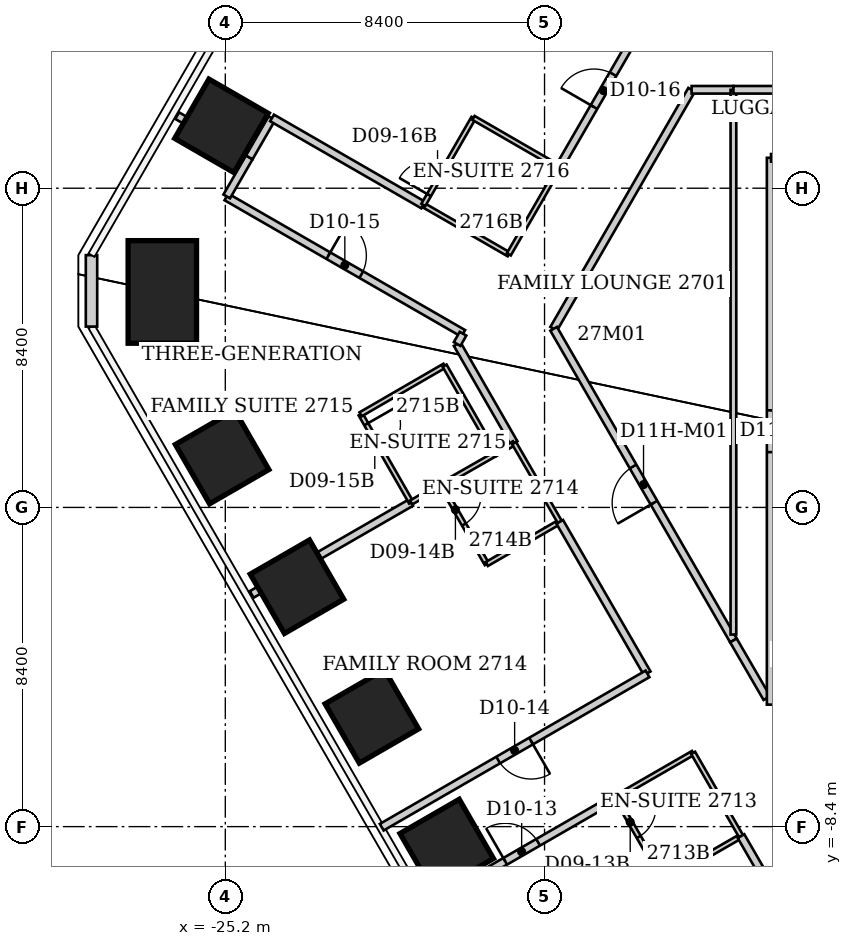
"""IFC4 building model, lengths in metres.
Left out: names, types, materials, properties, quantities, classifications, styles, units other than length and angle.
Written with IfcOpenShell. Run it as: python <this file> out.ifc"""

import sys

from ifc_helpers import new_model, si_unit, direction, frame, frame_2d, origin, origin_2d, place, context, subcontext, project, spatial, rectangle, extrude, element, fill, save


model = new_model("IFC4")
c1 = context("Model", 3, precision=1e-05, world=origin(), true_north=direction((0.0, 1.0)))
c2 = subcontext(c1, "Body", "Model", "MODEL_VIEW")
j1 = project(units=[si_unit("LENGTHUNIT", "METRE"), si_unit("PLANEANGLEUNIT", "RADIAN")], contexts=[c1])
p1 = place(None, origin())
s1 = spatial("IfcSite", under=j1, at=p1, CompositionType="ELEMENT")
p2 = place(p1, origin())
s2 = spatial("IfcBuilding", under=s1, at=p2, CompositionType="ELEMENT")
p3 = place(p2, frame((0.0, 0.0, 112.0)))
s3 = spatial("IfcBuildingStorey", under=s2, at=p3, CompositionType="ELEMENT", Elevation=112.0)
for number, where, z_axis, x_axis in (
    (1, (-19.374, -8.911, 0.0), (0.0, 0.0, 1.0), (-0.866, -0.5, 0.0)),
    (2, (-21.344, -5.499, 0.0), (0.0, 0.0, 1.0), (-0.866, -0.5, 0.0)),
    (3, (-23.314, -2.087, 0.0), (0.0, 0.0, 1.0), (-0.866, -0.5, 0.0)),
    (4, (-25.284, 1.325, 0.0), (0.0, 0.0, 1.0), (-0.866, -0.5, 0.0)),
):
    element("IfcColumn", number, at=place(p3, frame(where, z_axis=z_axis, x_axis=x_axis)), inside=s3, PredefinedType="COLUMN", context=c2, shape_type="SweptSolid", body=[
        extrude(rectangle(XDim=1.8, YDim=1.8, at=origin_2d()), origin(), (0.0, 0.0, 1.0), 3.8),
    ])
p4 = place(p3, frame((-26.857, 5.67, 0.0), z_axis=(0.0, 0.0, 1.0), x_axis=(-1.0, 0.0, 0.0)))
e5 = element("IfcColumn", 5, at=p4, inside=s3, PredefinedType="COLUMN", context=c2, shape_type="SweptSolid", body=[
    extrude(rectangle(XDim=1.8, YDim=2.7, at=origin_2d()), origin(), (0.0, 0.0, 1.0), 3.8),
])
p5 = place(p3, frame((-25.302, 10.041, 0.0), z_axis=(0.0, 0.0, 1.0), x_axis=(-0.866025403784, 0.5, 0.0)))
e6 = element("IfcColumn", 6, at=p5, inside=s3, PredefinedType="COLUMN", context=c2, shape_type="SweptSolid", body=[
    extrude(rectangle(XDim=1.8, YDim=1.8, at=origin_2d()), origin(), (0.0, 0.0, 1.0), 3.8),
])
p6 = place(p3, frame((-28.721, 4.759, 0.0), z_axis=(0.0, 0.0, 1.0), x_axis=(0.0, 1.0, 0.0)))
e7 = element("IfcWall", 7, at=p6, inside=s3, PredefinedType="SOLIDWALL", context=c2, shape_type="SweptSolid", body=[
    extrude(rectangle(XDim=1.88, YDim=0.3, at=frame_2d((0.94, 0.0))), origin(), (0.0, 0.0, 1.0), 3.64),
])
p7 = place(p3, frame((-26.466, 10.31, 0.0), z_axis=(0.0, 0.0, 1.0), x_axis=(0.865037029405, -0.501708020425, 0.0)))
e8 = element("IfcWall", 8, at=p7, inside=s3, PredefinedType="PARTITIONING", context=c2, shape_type="SweptSolid", body=[
    extrude(rectangle(XDim=2.177, YDim=0.2, at=frame_2d((1.089, 0.0))), origin(), (0.0, 0.0, 1.0), 3.64),
])
p8 = place(p3, frame((-25.17, 8.17, 0.0), z_axis=(0.0, 0.0, 1.0), x_axis=(0.866448885678, -0.499265789443, 0.0)))
e9 = element("IfcWall", 9, at=p8, inside=s3, PredefinedType="PARTITIONING", context=c2, shape_type="SweptSolid", body=[
    extrude(rectangle(XDim=7.19, YDim=0.2, at=frame_2d((3.595, 0.0))), origin(), (0.0, 0.0, 1.0), 3.64),
])
p9 = place(p8, frame((3.095, 0.0, 0.0)))
e10 = element("IfcOpeningElement", 10, at=p9, cuts=e9, PredefinedType="OPENING", context=c2, shape_type="SweptSolid", body=[
    extrude(rectangle(XDim=1.0, YDim=2.13, at=frame_2d((0.5, 1.065))), frame((0.0, 0.1, 0.0), z_axis=(0.0, -1.0, 0.0), x_axis=(1.0, 0.0, 0.0)), (0.0, 0.0, 1.0), 0.2),
])
p10 = place(p3, frame((-25.163, 8.183, 0.0), z_axis=(0.0, 0.0, 1.0), x_axis=(0.499793761865, 0.866144442689, 0.0)))
e11 = element("IfcWall", 11, at=p10, inside=s3, PredefinedType="PARTITIONING", context=c2, shape_type="SweptSolid", body=[
    extrude(rectangle(XDim=1.186, YDim=0.2, at=frame_2d((0.593, 0.0))), origin(), (0.0, 0.0, 1.0), 3.64),
])
p11 = place(p3, frame((-24.57, 9.21, 0.0), z_axis=(0.0, 0.0, 1.0), x_axis=(0.499734288277, 0.866178758179, 0.0)))
e12 = element("IfcWall", 12, at=p11, inside=s3, PredefinedType="PARTITIONING", context=c2, shape_type="SweptSolid", body=[
    extrude(rectangle(XDim=1.191, YDim=0.2, at=frame_2d((0.595, 0.0))), origin(), (0.0, 0.0, 1.0), 3.64),
])
p12 = place(p3, frame((-24.506, -2.29, 0.0), z_axis=(0.0, 0.0, 1.0), x_axis=(0.86626361228, 0.499587183622, 0.0)))
e13 = element("IfcWall", 13, at=p12, inside=s3, PredefinedType="PARTITIONING", context=c2, shape_type="SweptSolid", body=[
    extrude(rectangle(XDim=4.844, YDim=0.2, at=frame_2d((2.422, 0.0))), origin(), (0.0, 0.0, 1.0), 3.64),
])
p13 = place(p3, frame((-23.97, 10.25, 0.0), z_axis=(0.0, 0.0, 1.0), x_axis=(0.86645101645, -0.499262091585, 0.0)))
e14 = element("IfcWall", 14, at=p13, inside=s3, PredefinedType="PARTITIONING", context=c2, shape_type="SweptSolid", body=[
    extrude(rectangle(XDim=4.592, YDim=0.2, at=frame_2d((2.296, 0.0))), origin(), (0.0, 0.0, 1.0), 3.64),
])
p14 = place(p3, frame((-21.64, 2.45, 0.0), z_axis=(0.0, 0.0, 1.0), x_axis=(0.497288831399, -0.867585049529, 0.0)))
e15 = element("IfcWall", 15, at=p14, inside=s3, PredefinedType="PARTITIONING", context=c2, shape_type="SweptSolid", body=[
    extrude(rectangle(XDim=2.674, YDim=0.12, at=frame_2d((1.337, 0.0))), origin(), (0.0, 0.0, 1.0), 3.64),
])
p15 = place(p14, frame((0.3, 0.0, 0.0)))
e16 = element("IfcOpeningElement", 16, at=p15, cuts=e15, PredefinedType="OPENING", context=c2, shape_type="SweptSolid", body=[
    extrude(rectangle(XDim=0.9, YDim=2.03, at=frame_2d((0.45, 1.015))), frame((0.0, 0.06, 0.0), z_axis=(0.0, -1.0, 0.0), x_axis=(1.0, 0.0, 0.0)), (0.0, 0.0, 1.0), 0.12),
])
p16 = place(p3, frame((-20.31, 0.13, 0.0), z_axis=(0.0, 0.0, 1.0), x_axis=(0.864088651014, 0.503339649926, 0.0)))
e17 = element("IfcWall", 17, at=p16, inside=s3, PredefinedType="PARTITIONING", context=c2, shape_type="SweptSolid", body=[
    extrude(rectangle(XDim=0.914, YDim=0.12, at=frame_2d((0.457, 0.0))), origin(), (0.0, 0.0, 1.0), 3.64),
])
p17 = place(p3, frame((-19.991, 7.958, 0.0), z_axis=(0.0, 0.0, 1.0), x_axis=(0.866404475641, -0.499342852747, 0.0)))
e18 = element("IfcWall", 18, at=p17, inside=s3, PredefinedType="PARTITIONING", context=c2, shape_type="SweptSolid", body=[
    extrude(rectangle(XDim=2.599, YDim=0.12, at=frame_2d((1.299, 0.0))), origin(), (0.0, 0.0, 1.0), 3.64),
])
p18 = place(p3, frame((-19.884, -10.495, 0.0), z_axis=(0.0, 0.0, 1.0), x_axis=(0.86608558139, 0.499895754841, 0.0)))
e19 = element("IfcWall", 19, at=p18, inside=s3, PredefinedType="PARTITIONING", context=c2, shape_type="SweptSolid", body=[
    extrude(rectangle(XDim=5.732, YDim=0.2, at=frame_2d((2.866, 0.0))), origin(), (0.0, 0.0, 1.0), 3.64),
])
p19 = place(p18, frame((2.366, 0.0, 0.0)))
e20 = element("IfcOpeningElement", 20, at=p19, cuts=e19, PredefinedType="OPENING", context=c2, shape_type="SweptSolid", body=[
    extrude(rectangle(XDim=1.0, YDim=2.13, at=frame_2d((0.5, 1.065))), frame((0.0, 0.1, 0.0), z_axis=(0.0, -1.0, 0.0), x_axis=(1.0, 0.0, 0.0)), (0.0, 0.0, 1.0), 0.2),
])
p20 = place(p3, frame((-19.52, 0.59, 0.0), z_axis=(0.0, 0.0, 1.0), x_axis=(0.499693115345, -0.866202511239, 0.0)))
e21 = element("IfcWall", 21, at=p20, inside=s3, PredefinedType="PARTITIONING", context=c2, shape_type="SweptSolid", body=[
    extrude(rectangle(XDim=2.401, YDim=0.12, at=frame_2d((1.201, 0.0))), origin(), (0.0, 0.0, 1.0), 3.64),
])
p21 = place(p20, frame((0.3, 0.0, 0.0)))
e22 = element("IfcOpeningElement", 22, at=p21, cuts=e21, PredefinedType="OPENING", context=c2, shape_type="SweptSolid", body=[
    extrude(rectangle(XDim=0.9, YDim=2.03, at=frame_2d((0.45, 1.015))), frame((0.0, 0.06, 0.0), z_axis=(0.0, -1.0, 0.0), x_axis=(1.0, 0.0, 0.0)), (0.0, 0.0, 1.0), 0.12),
])
p22 = place(p3, frame((-19.52, 0.59, 0.0), z_axis=(0.0, 0.0, 1.0), x_axis=(0.868013991935, 0.496539736381, 0.0)))
e23 = element("IfcWall", 23, at=p22, inside=s3, PredefinedType="PARTITIONING", context=c2, shape_type="SweptSolid", body=[
    extrude(rectangle(XDim=1.64, YDim=0.12, at=frame_2d((0.82, 0.0))), origin(), (0.0, 0.0, 1.0), 3.64),
])
p23 = place(p3, frame((-19.43, 3.73, 0.0), z_axis=(0.0, 0.0, 1.0), x_axis=(-0.865328095335, -0.50120583339, 0.0)))
e24 = element("IfcWall", 24, at=p23, inside=s3, PredefinedType="PARTITIONING", context=c2, shape_type="SweptSolid", body=[
    extrude(rectangle(XDim=2.554, YDim=0.12, at=frame_2d((1.277, 0.0))), origin(), (0.0, 0.0, 1.0), 3.64),
])
p24 = place(p3, frame((-19.1, 4.3, 0.0), z_axis=(0.0, 0.0, 1.0), x_axis=(0.498268459914, -0.867022803538, 0.0)))
e25 = element("IfcWall", 25, at=p24, inside=s3, PredefinedType="PARTITIONING", context=c2, shape_type="SweptSolid", body=[
    extrude(rectangle(XDim=3.01, YDim=0.2, at=frame_2d((1.505, 0.0))), origin(), (0.0, 0.0, 1.0), 3.64),
])
p25 = place(p3, frame((-18.945, 4.571, 0.0), z_axis=(0.0, 0.0, 1.0), x_axis=(-0.496223092577, -0.868195048588, 0.0)))
e26 = element("IfcWall", 26, at=p25, inside=s3, PredefinedType="PARTITIONING", context=c2, shape_type="SweptSolid", body=[
    extrude(rectangle(XDim=0.312, YDim=0.2, at=frame_2d((0.156, 0.0))), origin(), (0.0, 0.0, 1.0), 3.64),
])
p26 = place(p3, frame((-18.67, 10.25, 0.0), z_axis=(0.0, 0.0, 1.0), x_axis=(-0.499407914056, -0.866366975004, 0.0)))
e27 = element("IfcWall", 27, at=p26, inside=s3, PredefinedType="PARTITIONING", context=c2, shape_type="SweptSolid", body=[
    extrude(rectangle(XDim=2.643, YDim=0.12, at=frame_2d((1.322, 0.0))), origin(), (0.0, 0.0, 1.0), 3.64),
])
p27 = place(p26, frame((1.443, 0.0, 0.0)))
e28 = element("IfcOpeningElement", 28, at=p27, cuts=e27, PredefinedType="OPENING", context=c2, shape_type="SweptSolid", body=[
    extrude(rectangle(XDim=0.9, YDim=2.03, at=frame_2d((0.45, 1.015))), frame((0.0, 0.06, 0.0), z_axis=(0.0, -1.0, 0.0), x_axis=(1.0, 0.0, 0.0)), (0.0, 0.0, 1.0), 0.12),
])
p28 = place(p3, frame((-18.32, -1.49, 0.0), z_axis=(0.0, 0.0, 1.0), x_axis=(0.865732595383, 0.500506816428, 0.0)))
e29 = element("IfcWall", 29, at=p28, inside=s3, PredefinedType="PARTITIONING", context=c2, shape_type="SweptSolid", body=[
    extrude(rectangle(XDim=2.218, YDim=0.12, at=frame_2d((1.109, 0.0))), origin(), (0.0, 0.0, 1.0), 3.023),
])
p29 = place(p3, frame((-18.1, 1.41, 0.0), z_axis=(0.0, 0.0, 1.0), x_axis=(-0.497288831399, 0.867585049529, 0.0)))
e30 = element("IfcWall", 30, at=p29, inside=s3, PredefinedType="PARTITIONING", context=c2, shape_type="SweptSolid", body=[
    extrude(rectangle(XDim=2.674, YDim=0.12, at=frame_2d((1.337, 0.0))), origin(), (0.0, 0.0, 1.0), 3.64),
])
p30 = place(p3, frame((-18.097, 1.404, 0.0), z_axis=(0.0, 0.0, 1.0), x_axis=(0.866823419736, 0.498615241441, 0.0)))
e31 = element("IfcWall", 31, at=p30, inside=s3, PredefinedType="PARTITIONING", context=c2, shape_type="SweptSolid", body=[
    extrude(rectangle(XDim=0.573, YDim=0.12, at=frame_2d((0.286, 0.0))), origin(), (0.0, 0.0, 1.0), 3.64),
])
p31 = place(p3, frame((-17.74, 6.66, 0.0), z_axis=(0.0, 0.0, 1.0), x_axis=(0.500519174073, 0.865725450929, 0.0)))
e32 = element("IfcWall", 32, at=p31, inside=s3, PredefinedType="PARTITIONING", context=c2, shape_type="SweptSolid", body=[
    extrude(rectangle(XDim=2.643, YDim=0.12, at=frame_2d((1.322, 0.0))), origin(), (0.0, 0.0, 1.0), 3.64),
])
p32 = place(p3, frame((-17.6, 1.69, 0.0), z_axis=(0.0, 0.0, 1.0), x_axis=(0.501579132034, -0.865111769836, 0.0)))
e33 = element("IfcWall", 33, at=p32, inside=s3, PredefinedType="PARTITIONING", context=c2, shape_type="SweptSolid", body=[
    extrude(rectangle(XDim=2.393, YDim=0.12, at=frame_2d((1.196, 0.0))), origin(), (0.0, 0.0, 1.0), 3.64),
])
p33 = place(p3, frame((-16.56, 4.7, 0.0), z_axis=(0.0, 0.0, 1.0), x_axis=(0.4998524389, 0.866110581465, 0.0)))
e34 = element("IfcWall", 34, at=p33, inside=s3, PredefinedType="PARTITIONING", context=c2, shape_type="SweptSolid", body=[
    extrude(rectangle(XDim=7.262, YDim=0.2, at=frame_2d((3.631, 0.0))), origin(), (0.0, 0.0, 1.0), 3.64),
])
p34 = place(p3, frame((-16.42, 8.95, 0.0), z_axis=(0.0, 0.0, 1.0), x_axis=(-0.865856933682, 0.500291685314, 0.0)))
e35 = element("IfcWall", 35, at=p34, inside=s3, PredefinedType="PARTITIONING", context=c2, shape_type="SweptSolid", body=[
    extrude(rectangle(XDim=2.599, YDim=0.12, at=frame_2d((1.299, 0.0))), origin(), (0.0, 0.0, 1.0), 3.64),
])
p35 = place(p3, frame((-16.417, 8.948, 0.0), z_axis=(0.0, 0.0, 1.0), x_axis=(0.500547653499, 0.865708984923, 0.0)))
e36 = element("IfcWall", 36, at=p35, inside=s3, PredefinedType="PARTITIONING", context=c2, shape_type="SweptSolid", body=[
    extrude(rectangle(XDim=4.669, YDim=0.2, at=frame_2d((2.334, 0.0))), origin(), (0.0, 0.0, 1.0), 3.64),
])
p36 = place(p35, frame((1.834, 0.0, 0.0)))
e37 = element("IfcOpeningElement", 37, at=p36, cuts=e36, PredefinedType="OPENING", context=c2, shape_type="SweptSolid", body=[
    extrude(rectangle(XDim=1.0, YDim=2.13, at=frame_2d((0.5, 1.065))), frame((0.0, 0.1, 0.0), z_axis=(0.0, -1.0, 0.0), x_axis=(1.0, 0.0, 0.0)), (0.0, 0.0, 1.0), 0.2),
])
p37 = place(p3, frame((-16.4, -0.38, 0.0), z_axis=(0.0, 0.0, 1.0), x_axis=(0.500091179446, -0.865972754907, 0.0)))
e38 = element("IfcWall", 38, at=p37, inside=s3, PredefinedType="PARTITIONING", context=c2, shape_type="SweptSolid", body=[
    extrude(rectangle(XDim=4.604, YDim=0.2, at=frame_2d((2.302, 0.0))), origin(), (0.0, 0.0, 1.0), 3.64),
])
p38 = place(p3, frame((-14.92, -7.63, 0.0), z_axis=(0.0, 0.0, 1.0), x_axis=(0.498665353881, -0.866794592068, 0.0)))
e39 = element("IfcWall", 39, at=p38, inside=s3, PredefinedType="PARTITIONING", context=c2, shape_type="SweptSolid", body=[
    extrude(rectangle(XDim=2.527, YDim=0.12, at=frame_2d((1.263, 0.0))), origin(), (0.0, 0.0, 1.0), 3.64),
])
p39 = place(p38, frame((0.3, 0.0, 0.0)))
e40 = element("IfcOpeningElement", 40, at=p39, cuts=e39, PredefinedType="OPENING", context=c2, shape_type="SweptSolid", body=[
    extrude(rectangle(XDim=0.9, YDim=2.03, at=frame_2d((0.45, 1.015))), frame((0.0, 0.06, 0.0), z_axis=(0.0, -1.0, 0.0), x_axis=(1.0, 0.0, 0.0)), (0.0, 0.0, 1.0), 0.12),
])
p40 = place(p3, frame((-14.92, -7.63, 0.0), z_axis=(0.0, 0.0, 1.0), x_axis=(0.866390229467, 0.499367570316, 0.0)))
e41 = element("IfcWall", 41, at=p40, inside=s3, PredefinedType="PARTITIONING", context=c2, shape_type="SweptSolid", body=[
    extrude(rectangle(XDim=2.343, YDim=0.12, at=frame_2d((1.171, 0.0))), origin(), (0.0, 0.0, 1.0), 3.64),
])
p41 = place(p3, frame((-14.09, -4.38, 0.0), z_axis=(0.0, 0.0, 1.0), x_axis=(-0.866174008169, -0.499742521277, 0.0)))
e42 = element("IfcWall", 42, at=p41, inside=s3, PredefinedType="PARTITIONING", context=c2, shape_type="SweptSolid", body=[
    extrude(rectangle(XDim=8.074, YDim=0.2, at=frame_2d((4.037, 0.0))), origin(), (0.0, 0.0, 1.0), 3.64),
])
p42 = place(p41, frame((3.537, 0.0, 0.0)))
e43 = element("IfcOpeningElement", 43, at=p42, cuts=e42, PredefinedType="OPENING", context=c2, shape_type="SweptSolid", body=[
    extrude(rectangle(XDim=1.0, YDim=2.13, at=frame_2d((0.5, 1.065))), frame((0.0, 0.1, 0.0), z_axis=(0.0, -1.0, 0.0), x_axis=(1.0, 0.0, 0.0)), (0.0, 0.0, 1.0), 0.2),
])
p43 = place(p3, frame((-13.66, -9.82, 0.0), z_axis=(0.0, 0.0, 1.0), x_axis=(0.866345142729, 0.499445786517, 0.0)))
e44 = element("IfcWall", 44, at=p43, inside=s3, PredefinedType="PARTITIONING", context=c2, shape_type="SweptSolid", body=[
    extrude(rectangle(XDim=2.343, YDim=0.12, at=frame_2d((1.171, 0.0))), origin(), (0.0, 0.0, 1.0), 3.64),
])
p44 = place(p3, frame((-12.93, 10.99, 0.0), z_axis=(0.0, 0.0, 1.0), x_axis=(1.0, 0.0, 0.0)))
e45 = element("IfcWall", 45, at=p44, inside=s3, PredefinedType="PARTITIONING", context=c2, shape_type="SweptSolid", body=[
    extrude(rectangle(XDim=1.1, YDim=0.2, at=frame_2d((0.55, 0.0))), origin(), (0.0, 0.0, 1.0), 3.64),
])
p45 = place(p3, frame((-12.89, -6.46, 0.0), z_axis=(0.0, 0.0, 1.0), x_axis=(0.498707120669, -0.866770562372, 0.0)))
e46 = element("IfcWall", 46, at=p45, inside=s3, PredefinedType="PARTITIONING", context=c2, shape_type="SweptSolid", body=[
    extrude(rectangle(XDim=2.527, YDim=0.12, at=frame_2d((1.263, 0.0))), origin(), (0.0, 0.0, 1.0), 3.64),
])
p46 = place(p3, frame((-11.83, -3.5, 0.0), z_axis=(0.0, 0.0, 1.0), x_axis=(-0.499662169849, 0.866220362276, 0.0)))
e47 = element("IfcWall", 47, at=p46, inside=s3, PredefinedType="PARTITIONING", context=c2, shape_type="SweptSolid", body=[
    extrude(rectangle(XDim=9.466, YDim=0.2, at=frame_2d((4.733, 0.0))), origin(), (0.0, 0.0, 1.0), 3.64),
])
p47 = place(p46, frame((4.183, 0.0, 0.0)))
e48 = element("IfcOpeningElement", 48, at=p47, cuts=e47, PredefinedType="OPENING", context=c2, shape_type="SweptSolid", body=[
    extrude(rectangle(XDim=1.1, YDim=2.2, at=frame_2d((0.55, 1.1))), frame((0.0, 0.1, 0.0), z_axis=(0.0, -1.0, 0.0), x_axis=(1.0, 0.0, 0.0)), (0.0, 0.0, 1.0), 0.2),
])
p48 = place(p3, frame((-11.83, 10.99, 0.0), z_axis=(0.0, 0.0, 1.0), x_axis=(0.0, -1.0, 0.0)))
e49 = element("IfcWall", 49, at=p48, inside=s3, PredefinedType="PARTITIONING", context=c2, shape_type="SweptSolid", body=[
    extrude(rectangle(XDim=14.335, YDim=0.15, at=frame_2d((7.167, 0.0))), origin(), (0.0, 0.0, 1.0), 3.64),
])
p49 = place(p3, frame((-11.83, 10.99, 0.0), z_axis=(0.0, 0.0, 1.0), x_axis=(1.0, 0.0, 0.0)))
e50 = element("IfcWall", 50, at=p49, inside=s3, PredefinedType="PARTITIONING", context=c2, shape_type="SweptSolid", body=[
    extrude(rectangle(XDim=4.73, YDim=0.2, at=frame_2d((2.365, 0.0))), origin(), (0.0, 0.0, 1.0), 3.64),
])
p50 = place(p3, frame((-11.63, -8.65, 0.0), z_axis=(0.0, 0.0, 1.0), x_axis=(0.499966166967, -0.866044936414, 0.0)))
e51 = element("IfcWall", 51, at=p50, inside=s3, PredefinedType="PARTITIONING", context=c2, shape_type="SweptSolid", body=[
    extrude(rectangle(XDim=4.48, YDim=0.2, at=frame_2d((2.24, 0.0))), origin(), (0.0, 0.0, 1.0), 3.64),
])
p51 = place(p3, frame((-10.95, -5.017, 0.0), z_axis=(0.0, 0.0, 1.0), x_axis=(-0.501601410683, 0.865098852618, 0.0)))
e52 = element("IfcWall", 52, at=p51, inside=s3, PredefinedType="PARTITIONING", context=c2, shape_type="SweptSolid", body=[
    extrude(rectangle(XDim=1.754, YDim=0.2, at=frame_2d((0.877, 0.0))), origin(), (0.0, 0.0, 1.0), 3.64),
])
p52 = place(p3, frame((-10.85, 9.2, 0.0), z_axis=(0.0, 0.0, 1.0), x_axis=(0.0, -1.0, 0.0)))
e53 = element("IfcWall", 53, at=p52, inside=s3, PredefinedType="PARTITIONING", context=c2, shape_type="SweptSolid", body=[
    extrude(rectangle(XDim=14.39, YDim=0.2, at=frame_2d((7.195, 0.0))), origin(), (0.0, 0.0, 1.0), 3.64),
])
p53 = place(p52, frame((6.645, 0.0, 0.0)))
e54 = element("IfcOpeningElement", 54, at=p53, cuts=e53, PredefinedType="OPENING", context=c2, shape_type="SweptSolid", body=[
    extrude(rectangle(XDim=1.1, YDim=2.2, at=frame_2d((0.55, 1.1))), frame((0.0, 0.1, 0.0), z_axis=(0.0, -1.0, 0.0), x_axis=(1.0, 0.0, 0.0)), (0.0, 0.0, 1.0), 0.2),
])
p54 = place(p3, frame((-7.1, 9.2, 0.0), z_axis=(0.0, 0.0, 1.0), x_axis=(-1.0, 0.0, 0.0)))
e55 = element("IfcWall", 55, at=p54, inside=s3, PredefinedType="PARTITIONING", context=c2, shape_type="SweptSolid", body=[
    extrude(rectangle(XDim=3.74, YDim=0.2, at=frame_2d((1.87, 0.0))), origin(), (0.0, 0.0, 1.0), 3.64),
])
p55 = place(p19, origin())
e56 = element("IfcDoor", 56, at=p55, inside=s3, OperationType="SINGLE_SWING_LEFT", PredefinedType="DOOR", context=c2, shape_type="SweptSolid", body=[
    extrude(rectangle(XDim=1.0, YDim=2.13, at=frame_2d((0.5, 1.065))), frame((0.0, 0.025, 0.0), z_axis=(0.0, -1.0, 0.0), x_axis=(1.0, 0.0, 0.0)), (0.0, 0.0, 1.0), 0.05),
])
fill(e20, e56)
p56 = place(p39, origin())
e57 = element("IfcDoor", 57, at=p56, inside=s3, OperationType="SINGLE_SWING_LEFT", PredefinedType="DOOR", context=c2, shape_type="SweptSolid", body=[
    extrude(rectangle(XDim=0.9, YDim=2.03, at=frame_2d((0.45, 1.015))), frame((0.0, 0.025, 0.0), z_axis=(0.0, -1.0, 0.0), x_axis=(1.0, 0.0, 0.0)), (0.0, 0.0, 1.0), 0.05),
])
fill(e40, e57)
p57 = place(p42, origin())
e58 = element("IfcDoor", 58, at=p57, inside=s3, OperationType="SINGLE_SWING_LEFT", PredefinedType="DOOR", context=c2, shape_type="SweptSolid", body=[
    extrude(rectangle(XDim=1.0, YDim=2.13, at=frame_2d((0.5, 1.065))), frame((0.0, 0.025, 0.0), z_axis=(0.0, -1.0, 0.0), x_axis=(1.0, 0.0, 0.0)), (0.0, 0.0, 1.0), 0.05),
])
fill(e43, e58)
p58 = place(p21, origin())
e59 = element("IfcDoor", 59, at=p58, inside=s3, OperationType="SINGLE_SWING_LEFT", PredefinedType="DOOR", context=c2, shape_type="SweptSolid", body=[
    extrude(rectangle(XDim=0.9, YDim=2.03, at=frame_2d((0.45, 1.015))), frame((0.0, 0.025, 0.0), z_axis=(0.0, -1.0, 0.0), x_axis=(1.0, 0.0, 0.0)), (0.0, 0.0, 1.0), 0.05),
])
fill(e22, e59)
p59 = place(p9, origin())
e60 = element("IfcDoor", 60, at=p59, inside=s3, OperationType="SINGLE_SWING_LEFT", PredefinedType="DOOR", context=c2, shape_type="SweptSolid", body=[
    extrude(rectangle(XDim=1.0, YDim=2.13, at=frame_2d((0.5, 1.065))), frame((0.0, 0.025, 0.0), z_axis=(0.0, -1.0, 0.0), x_axis=(1.0, 0.0, 0.0)), (0.0, 0.0, 1.0), 0.05),
])
fill(e10, e60)
p60 = place(p15, origin())
e61 = element("IfcDoor", 61, at=p60, inside=s3, OperationType="SINGLE_SWING_LEFT", PredefinedType="DOOR", context=c2, shape_type="SweptSolid", body=[
    extrude(rectangle(XDim=0.9, YDim=2.03, at=frame_2d((0.45, 1.015))), frame((0.0, 0.025, 0.0), z_axis=(0.0, -1.0, 0.0), x_axis=(1.0, 0.0, 0.0)), (0.0, 0.0, 1.0), 0.05),
])
fill(e16, e61)
p61 = place(p36, origin())
e62 = element("IfcDoor", 62, at=p61, inside=s3, OperationType="SINGLE_SWING_LEFT", PredefinedType="DOOR", context=c2, shape_type="SweptSolid", body=[
    extrude(rectangle(XDim=1.0, YDim=2.13, at=frame_2d((0.5, 1.065))), frame((0.0, 0.025, 0.0), z_axis=(0.0, -1.0, 0.0), x_axis=(1.0, 0.0, 0.0)), (0.0, 0.0, 1.0), 0.05),
])
fill(e37, e62)
p62 = place(p27, origin())
e63 = element("IfcDoor", 63, at=p62, inside=s3, OperationType="SINGLE_SWING_RIGHT", PredefinedType="DOOR", context=c2, shape_type="SweptSolid", body=[
    extrude(rectangle(XDim=0.9, YDim=2.03, at=frame_2d((0.45, 1.015))), frame((0.0, 0.025, 0.0), z_axis=(0.0, -1.0, 0.0), x_axis=(1.0, 0.0, 0.0)), (0.0, 0.0, 1.0), 0.05),
])
fill(e28, e63)
p63 = place(p47, origin())
e64 = element("IfcDoor", 64, at=p63, inside=s3, OperationType="SINGLE_SWING_LEFT", PredefinedType="DOOR", context=c2, shape_type="SweptSolid", body=[
    extrude(rectangle(XDim=1.1, YDim=2.2, at=frame_2d((0.55, 1.1))), frame((0.0, 0.025, 0.0), z_axis=(0.0, -1.0, 0.0), x_axis=(1.0, 0.0, 0.0)), (0.0, 0.0, 1.0), 0.05),
])
fill(e48, e64)
p64 = place(p53, origin())
e65 = element("IfcDoor", 65, at=p64, inside=s3, OperationType="SINGLE_SWING_LEFT", PredefinedType="DOOR", context=c2, shape_type="SweptSolid", body=[
    extrude(rectangle(XDim=1.1, YDim=2.2, at=frame_2d((0.55, 1.1))), frame((0.0, 0.025, 0.0), z_axis=(0.0, -1.0, 0.0), x_axis=(1.0, 0.0, 0.0)), (0.0, 0.0, 1.0), 0.05),
])
fill(e54, e65)
save(model, sys.argv[1])
